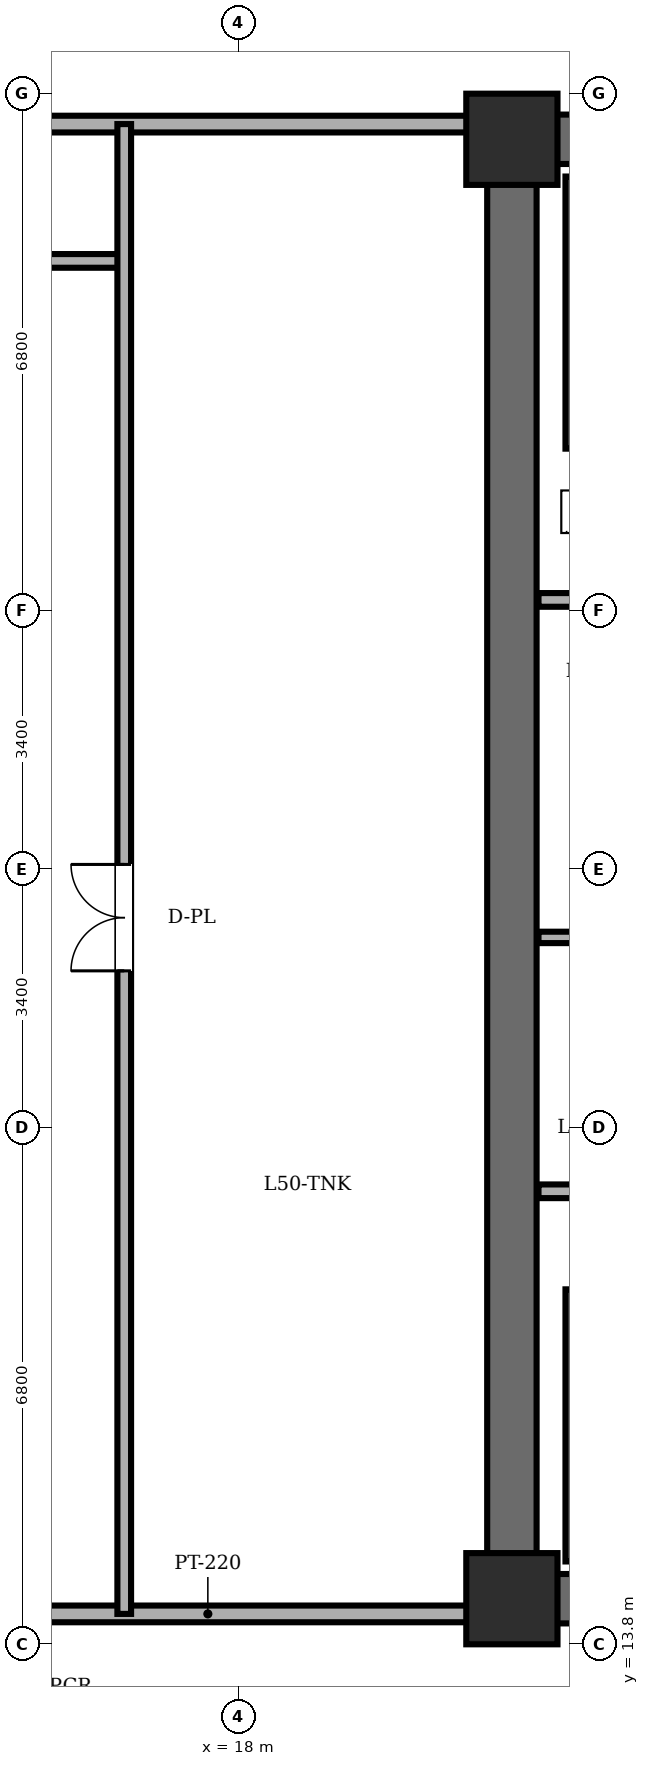
"""IFC4 building model, lengths in metres.
Left out: names, types, materials, properties, quantities, classifications, styles, units other than length and angle.
Written with IfcOpenShell. Run it as: python <this file> out.ifc"""

import sys

from ifc_helpers import new_model, si_unit, direction, frame, frame_2d, origin, origin_2d, place, context, subcontext, project, spatial, rectangle, extrude, element, fill, save


model = new_model("IFC4")
c1 = context("Model", 3, precision=1e-05, world=origin(), true_north=direction((0.0, 1.0)))
c2 = subcontext(c1, "Body", "Model", "MODEL_VIEW")
j1 = project(units=[si_unit("LENGTHUNIT", "METRE"), si_unit("PLANEANGLEUNIT", "RADIAN")], contexts=[c1])
p1 = place(None, origin())
s1 = spatial("IfcSite", under=j1, at=p1, CompositionType="ELEMENT")
p2 = place(p1, origin())
s2 = spatial("IfcBuilding", under=s1, at=p2, CompositionType="ELEMENT")
p3 = place(p2, frame((0.0, 0.0, 190.6)))
s3 = spatial("IfcBuildingStorey", under=s2, at=p3, CompositionType="ELEMENT", Elevation=190.6)
for number, where, z_axis, x_axis in (
    (1, (21.6, 14.4, 0.0), (0.0, 0.0, 1.0), (1.0, 0.0, 0.0)),
    (2, (21.6, 33.6, 0.0), (0.0, 0.0, 1.0), (1.0, 0.0, 0.0)),
):
    element("IfcColumn", number, at=place(p3, frame(where, z_axis=z_axis, x_axis=x_axis)), inside=s3, PredefinedType="COLUMN", context=c2, shape_type="SweptSolid", body=[
        extrude(rectangle(XDim=1.2, YDim=1.2, at=origin_2d()), origin(), (0.0, 0.0, 1.0), 5.6),
    ])
p4 = place(p3, frame((21.6, 14.4, 0.0), z_axis=(0.0, 0.0, 1.0), x_axis=(0.0, 1.0, 0.0)))
e3 = element("IfcWall", 3, at=p4, inside=s3, PredefinedType="SHEAR", context=c2, shape_type="SweptSolid", body=[
    extrude(rectangle(XDim=19.2, YDim=0.65, at=frame_2d((9.6, 0.0))), origin(), (0.0, 0.0, 1.0), 5.36),
])
for number, where, z_axis, x_axis in (
    (4, (21.6, 33.6, 0.0), (0.0, 0.0, 1.0), (1.0, 0.0, 0.0)),
    (5, (37.2, 14.4, 0.0), (0.0, 0.0, 1.0), (-1.0, 0.0, 0.0)),
):
    element("IfcWall", number, at=place(p3, frame(where, z_axis=z_axis, x_axis=x_axis)), inside=s3, PredefinedType="SHEAR", context=c2, shape_type="SweptSolid", body=[
        extrude(rectangle(XDim=15.6, YDim=0.65, at=frame_2d((7.8, 0.0))), origin(), (0.0, 0.0, 1.0), 5.36),
    ])
for number, where, z_axis, x_axis in (
    (6, (22.48, 29.53, 0.0), (0.0, 0.0, 1.0), (0.0, 1.0, 0.0)),
    (7, (22.48, 14.89, 0.0), (0.0, 0.0, 1.0), (0.0, 1.0, 0.0)),
):
    element("IfcWall", number, at=place(p3, frame(where, z_axis=z_axis, x_axis=x_axis)), inside=s3, PredefinedType="SOLIDWALL", context=c2, shape_type="SweptSolid", body=[
        extrude(rectangle(XDim=3.58, YDim=0.35, at=frame_2d((1.79, 0.0))), origin(), (0.0, 0.0, 1.0), 5.36),
    ])
p5 = place(p3, frame((21.95, 27.54, 0.0), z_axis=(0.0, 0.0, 1.0), x_axis=(1.0, 0.0, 0.0)))
e8 = element("IfcWall", 8, at=p5, inside=s3, PredefinedType="PARTITIONING", context=c2, shape_type="SweptSolid", body=[
    extrude(rectangle(XDim=10.56, YDim=0.18, at=frame_2d((5.28, 0.0))), origin(), (0.0, 0.0, 1.0), 5.36),
])
p6 = place(p3, frame((21.95, 19.76, 0.0), z_axis=(0.0, 0.0, 1.0), x_axis=(1.0, 0.0, 0.0)))
e9 = element("IfcWall", 9, at=p6, inside=s3, PredefinedType="PARTITIONING", context=c2, shape_type="SweptSolid", body=[
    extrude(rectangle(XDim=14.87, YDim=0.18, at=frame_2d((7.435, 0.0))), origin(), (0.0, 0.0, 1.0), 5.36),
])
p7 = place(p3, frame((21.95, 23.1, 0.0), z_axis=(0.0, 0.0, 1.0), x_axis=(1.0, 0.0, 0.0)))
e10 = element("IfcWall", 10, at=p7, inside=s3, PredefinedType="PARTITIONING", context=c2, shape_type="SweptSolid", body=[
    extrude(rectangle(XDim=2.51, YDim=0.15, at=frame_2d((1.255, 0.0))), origin(), (0.0, 0.0, 1.0), 5.36),
])
p8 = place(p3, frame((13.8, 14.2, 0.0), z_axis=(0.0, 0.0, 1.0), x_axis=(1.0, 0.0, 0.0)))
e11 = element("IfcWall", 11, at=p8, inside=s3, PredefinedType="PARTITIONING", context=c2, shape_type="SweptSolid", body=[
    extrude(rectangle(XDim=7.6, YDim=0.22, at=frame_2d((3.8, 0.0))), origin(), (0.0, 0.0, 1.0), 5.36),
])
p9 = place(p3, frame((13.8, 32.0, 0.0), z_axis=(0.0, 0.0, 1.0), x_axis=(1.0, 0.0, 0.0)))
e12 = element("IfcWall", 12, at=p9, inside=s3, PredefinedType="PARTITIONING", context=c2, shape_type="SweptSolid", body=[
    extrude(rectangle(XDim=2.7, YDim=0.18, at=frame_2d((1.35, 0.0))), origin(), (0.0, 0.0, 1.0), 5.36),
])
p10 = place(p3, frame((13.8, 33.8, 0.0), z_axis=(0.0, 0.0, 1.0), x_axis=(1.0, 0.0, 0.0)))
e13 = element("IfcWall", 13, at=p10, inside=s3, PredefinedType="PARTITIONING", context=c2, shape_type="SweptSolid", body=[
    extrude(rectangle(XDim=7.6, YDim=0.22, at=frame_2d((3.8, 0.0))), origin(), (0.0, 0.0, 1.0), 5.36),
])
p11 = place(p3, frame((16.5, 14.2, 0.0), z_axis=(0.0, 0.0, 1.0), x_axis=(0.0, 1.0, 0.0)))
e14 = element("IfcWall", 14, at=p11, inside=s3, PredefinedType="PARTITIONING", context=c2, shape_type="SweptSolid", body=[
    extrude(rectangle(XDim=19.6, YDim=0.18, at=frame_2d((9.8, 0.0))), origin(), (0.0, 0.0, 1.0), 5.36),
])
p12 = place(p11, frame((8.46, 0.0, 0.0)))
e15 = element("IfcOpeningElement", 15, at=p12, cuts=e14, PredefinedType="OPENING", context=c2, shape_type="SweptSolid", body=[
    extrude(rectangle(XDim=1.4, YDim=2.25, at=frame_2d((0.7, 1.125))), frame((0.0, 0.1, 0.0), z_axis=(0.0, -1.0, 0.0), x_axis=(1.0, 0.0, 0.0)), (0.0, 0.0, 1.0), 0.2),
])
p13 = place(p12, origin())
e16 = element("IfcDoor", 16, at=p13, inside=s3, OperationType="DOUBLE_DOOR_SINGLE_SWING", PredefinedType="DOOR", context=c2, shape_type="SweptSolid", body=[
    extrude(rectangle(XDim=1.4, YDim=2.25, at=frame_2d((0.7, 1.125))), frame((0.0, 0.025, 0.0), z_axis=(0.0, -1.0, 0.0), x_axis=(1.0, 0.0, 0.0)), (0.0, 0.0, 1.0), 0.05),
])
fill(e15, e16)
save(model, sys.argv[1])
